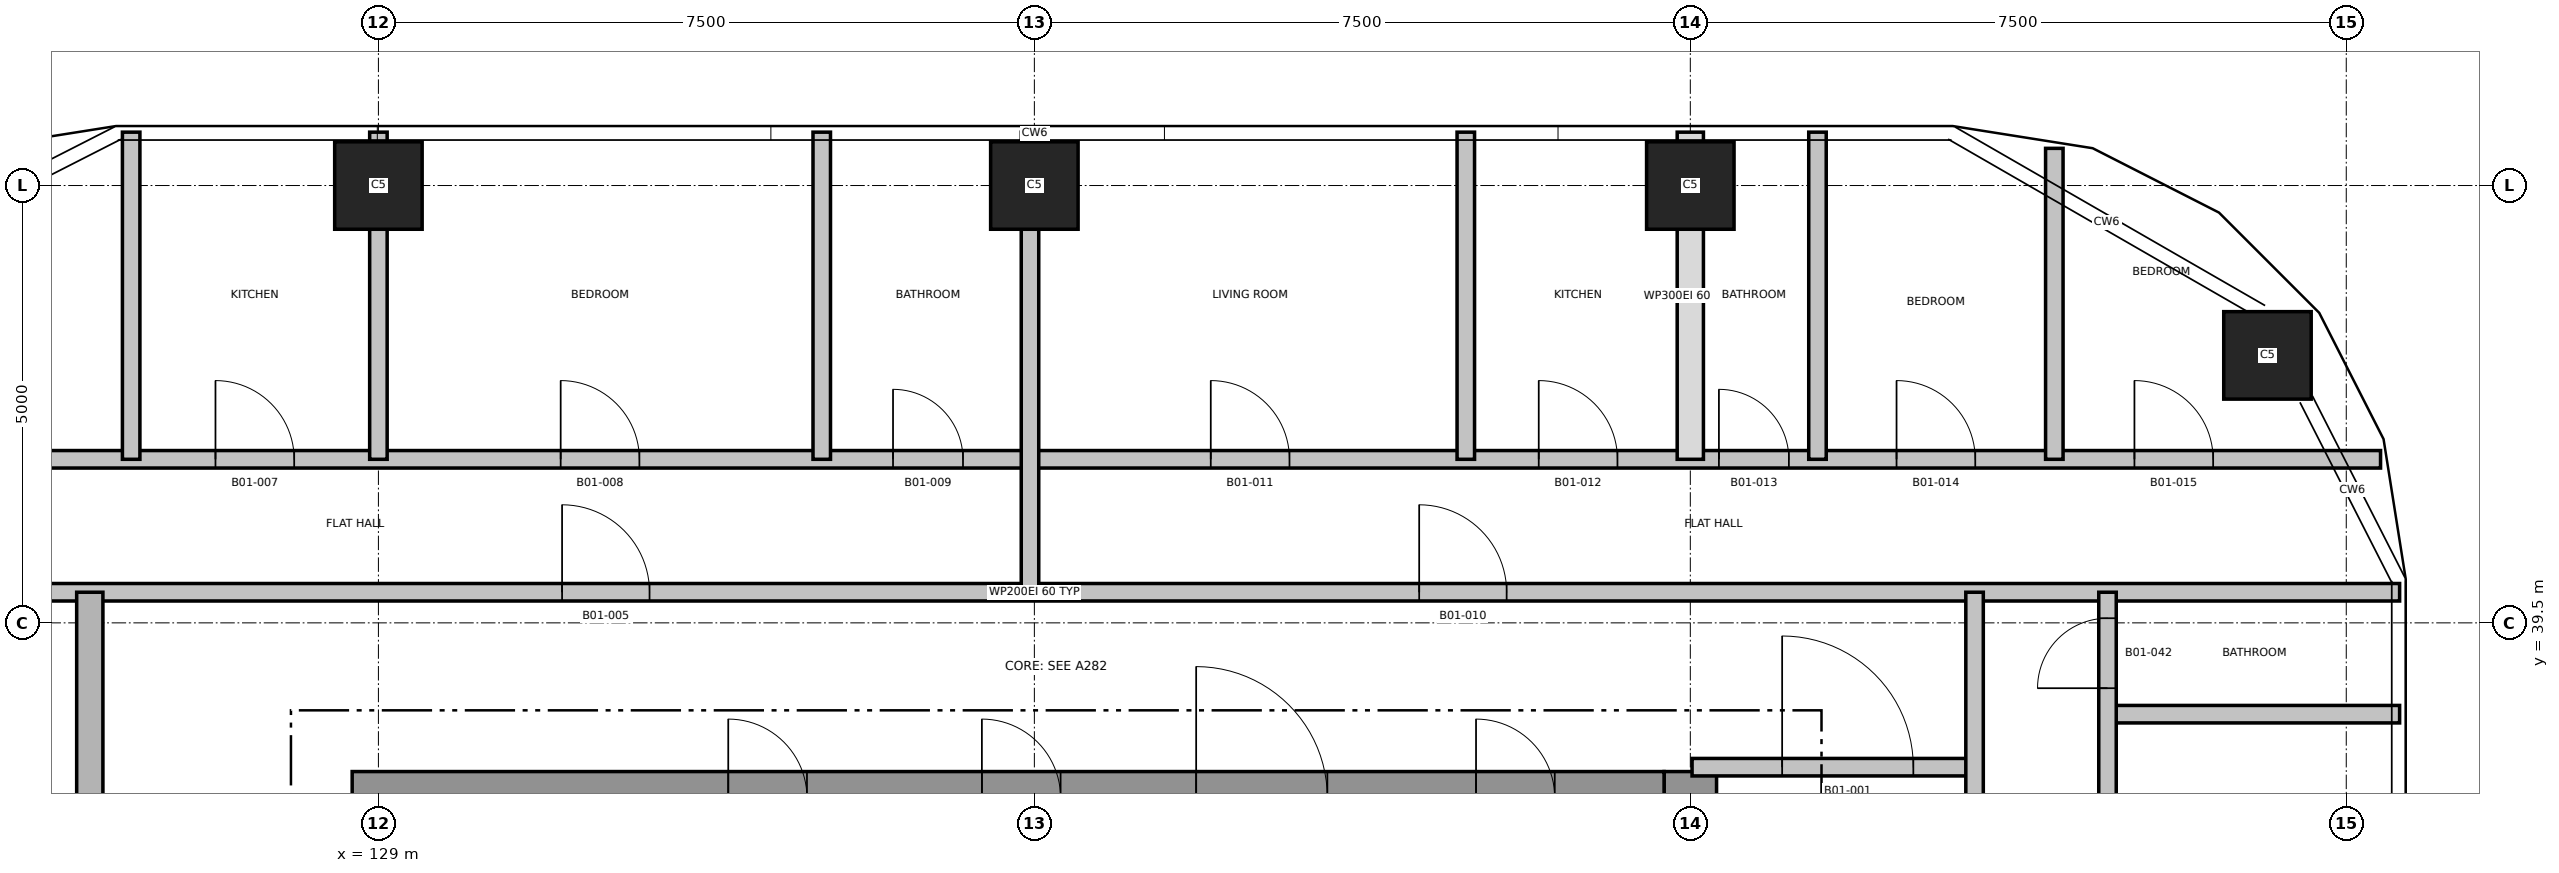
"""IFC4 building model, lengths in metres.
Left out: names, types, materials, properties, quantities, classifications, styles, units other than length and angle.
Written with IfcOpenShell. Run it as: python <this file> out.ifc"""

import sys

from ifc_helpers import new_model, si_unit, direction, frame, frame_2d, origin, origin_2d, place, context, subcontext, project, spatial, rectangle, extrude, element, fill, save


model = new_model("IFC4")
c1 = context("Model", 3, precision=1e-05, world=origin(), true_north=direction((0.0, 1.0)))
c2 = subcontext(c1, "Body", "Model", "MODEL_VIEW")
j1 = project(units=[si_unit("LENGTHUNIT", "METRE"), si_unit("PLANEANGLEUNIT", "RADIAN")], contexts=[c1])
p1 = place(None, origin())
s1 = spatial("IfcSite", under=j1, at=p1, CompositionType="ELEMENT")
p2 = place(p1, origin())
s2 = spatial("IfcBuilding", under=s1, at=p2, CompositionType="ELEMENT")
p3 = place(p2, frame((0.0, 0.0, 37.2)))
s3 = spatial("IfcBuildingStorey", under=s2, at=p3, CompositionType="ELEMENT", Elevation=37.2)
p4 = place(p3, frame((144.0, 24.2, 0.0), z_axis=(0.0, 0.0, 1.0), x_axis=(0.0, 1.0, 0.0)))
e1 = element("IfcWall", 1, at=p4, inside=s3, PredefinedType="SHEAR", context=c2, shape_type="SweptSolid", body=[
    extrude(rectangle(XDim=13.6, YDim=0.6, at=frame_2d((6.8, 0.0))), origin(), (0.0, 0.0, 1.0), 3.7),
])
p5 = place(p3, frame((128.7, 37.5, 0.0), z_axis=(0.0, 0.0, 1.0), x_axis=(1.0, 0.0, 0.0)))
e2 = element("IfcWall", 2, at=p5, inside=s3, PredefinedType="SHEAR", context=c2, shape_type="SweptSolid", body=[
    extrude(rectangle(XDim=15.0, YDim=0.6, at=frame_2d((7.5, 0.0))), origin(), (0.0, 0.0, 1.0), 3.7),
])
p6 = place(p5, frame((9.65, 0.0, 0.0)))
e3 = element("IfcOpeningElement", 3, at=p6, cuts=e2, PredefinedType="OPENING", context=c2, shape_type="SweptSolid", body=[
    extrude(rectangle(XDim=1.5, YDim=2.1, at=frame_2d((0.75, 1.05))), frame((0.0, 0.31, 0.0), z_axis=(0.0, -1.0, 0.0), x_axis=(1.0, 0.0, 0.0)), (0.0, 0.0, 1.0), 0.62),
])
p7 = place(p5, frame((12.85, 0.0, 0.0)))
e4 = element("IfcOpeningElement", 4, at=p7, cuts=e2, PredefinedType="OPENING", context=c2, shape_type="SweptSolid", body=[
    extrude(rectangle(XDim=0.9, YDim=2.1, at=frame_2d((0.45, 1.05))), frame((0.0, 0.31, 0.0), z_axis=(0.0, -1.0, 0.0), x_axis=(1.0, 0.0, 0.0)), (0.0, 0.0, 1.0), 0.62),
])
p8 = place(p5, frame((4.3, 0.0, 0.0)))
e5 = element("IfcOpeningElement", 5, at=p8, cuts=e2, PredefinedType="OPENING", context=c2, shape_type="SweptSolid", body=[
    extrude(rectangle(XDim=0.9, YDim=2.1, at=frame_2d((0.45, 1.05))), frame((0.0, 0.31, 0.0), z_axis=(0.0, -1.0, 0.0), x_axis=(1.0, 0.0, 0.0)), (0.0, 0.0, 1.0), 0.62),
])
p9 = place(p5, frame((7.2, 0.0, 0.0)))
e6 = element("IfcOpeningElement", 6, at=p9, cuts=e2, PredefinedType="OPENING", context=c2, shape_type="SweptSolid", body=[
    extrude(rectangle(XDim=0.9, YDim=2.1, at=frame_2d((0.45, 1.05))), frame((0.0, 0.31, 0.0), z_axis=(0.0, -1.0, 0.0), x_axis=(1.0, 0.0, 0.0)), (0.0, 0.0, 1.0), 0.62),
])
for number, where, z_axis, x_axis in (
    (7, (150.599, 42.558, 0.0), (0.0, 0.0, 1.0), (1.0, 0.0, 0.0)),
    (8, (129.0, 44.5, 0.0), (0.0, 0.0, 1.0), (1.0, 0.0, 0.0)),
    (9, (136.5, 44.5, 0.0), (0.0, 0.0, 1.0), (1.0, 0.0, 0.0)),
    (10, (144.0, 44.5, 0.0), (0.0, 0.0, 1.0), (1.0, 0.0, 0.0)),
):
    element("IfcColumn", number, at=place(p3, frame(where, z_axis=z_axis, x_axis=x_axis)), inside=s3, PredefinedType="COLUMN", context=c2, shape_type="SweptSolid", body=[
        extrude(rectangle(XDim=1.0, YDim=1.0, at=origin_2d()), origin(), (0.0, 0.0, 1.0), 3.7),
    ])
p10 = place(p3, frame((144.02, 37.85, 0.0), z_axis=(0.0, 0.0, 1.0), x_axis=(1.0, 0.0, 0.0)))
e11 = element("IfcWall", 11, at=p10, inside=s3, PredefinedType="PARTITIONING", context=c2, shape_type="SweptSolid", body=[
    extrude(rectangle(XDim=3.23, YDim=0.2, at=frame_2d((1.615, 0.0))), origin(), (0.0, 0.0, 1.0), 3.4),
])
p11 = place(p10, frame((1.03, 0.0, 0.0)))
e12 = element("IfcOpeningElement", 12, at=p11, cuts=e11, PredefinedType="OPENING", context=c2, shape_type="SweptSolid", body=[
    extrude(rectangle(XDim=1.5, YDim=2.1, at=frame_2d((0.75, 1.05))), frame((0.0, 0.11, 0.0), z_axis=(0.0, -1.0, 0.0), x_axis=(1.0, 0.0, 0.0)), (0.0, 0.0, 1.0), 0.22),
])
p12 = place(p3, frame((148.77, 38.456, 0.0), z_axis=(0.0, 0.0, 1.0), x_axis=(1.0, 0.0, 0.0)))
e13 = element("IfcWall", 13, at=p12, inside=s3, PredefinedType="PARTITIONING", context=c2, shape_type="SweptSolid", body=[
    extrude(rectangle(XDim=3.34, YDim=0.2, at=frame_2d((1.67, 0.0))), origin(), (0.0, 0.0, 1.0), 3.4),
])
p13 = place(p3, frame((120.89, 39.85, 0.0), z_axis=(0.0, 0.0, 1.0), x_axis=(1.0, 0.0, 0.0)))
e14 = element("IfcWall", 14, at=p13, inside=s3, PredefinedType="PARTITIONING", context=c2, shape_type="SweptSolid", body=[
    extrude(rectangle(XDim=31.22, YDim=0.2, at=frame_2d((15.61, 0.0))), origin(), (0.0, 0.0, 1.0), 3.4),
])
p14 = place(p13, frame((10.21, 0.0, 0.0)))
e15 = element("IfcOpeningElement", 15, at=p14, cuts=e14, PredefinedType="OPENING", context=c2, shape_type="SweptSolid", body=[
    extrude(rectangle(XDim=1.0, YDim=2.1, at=frame_2d((0.5, 1.05))), frame((0.0, 0.11, 0.0), z_axis=(0.0, -1.0, 0.0), x_axis=(1.0, 0.0, 0.0)), (0.0, 0.0, 1.0), 0.22),
])
p15 = place(p13, frame((20.01, 0.0, 0.0)))
e16 = element("IfcOpeningElement", 16, at=p15, cuts=e14, PredefinedType="OPENING", context=c2, shape_type="SweptSolid", body=[
    extrude(rectangle(XDim=1.0, YDim=2.1, at=frame_2d((0.5, 1.05))), frame((0.0, 0.11, 0.0), z_axis=(0.0, -1.0, 0.0), x_axis=(1.0, 0.0, 0.0)), (0.0, 0.0, 1.0), 0.22),
])
p16 = place(p3, frame((121.108, 41.37, 0.0), z_axis=(0.0, 0.0, 1.0), x_axis=(1.0, 0.0, 0.0)))
e17 = element("IfcWall", 17, at=p16, inside=s3, PredefinedType="PARTITIONING", context=c2, shape_type="SweptSolid", body=[
    extrude(rectangle(XDim=30.784, YDim=0.2, at=frame_2d((15.392, 0.0))), origin(), (0.0, 0.0, 1.0), 3.4),
])
p17 = place(p16, frame((2.081, 0.0, 0.0)))
e18 = element("IfcOpeningElement", 18, at=p17, cuts=e17, PredefinedType="OPENING", context=c2, shape_type="SweptSolid", body=[
    extrude(rectangle(XDim=0.9, YDim=2.1, at=frame_2d((0.45, 1.05))), frame((0.0, 0.11, 0.0), z_axis=(0.0, -1.0, 0.0), x_axis=(1.0, 0.0, 0.0)), (0.0, 0.0, 1.0), 0.22),
])
p18 = place(p16, frame((6.029, 0.0, 0.0)))
e19 = element("IfcOpeningElement", 19, at=p18, cuts=e17, PredefinedType="OPENING", context=c2, shape_type="SweptSolid", body=[
    extrude(rectangle(XDim=0.9, YDim=2.1, at=frame_2d((0.45, 1.05))), frame((0.0, 0.11, 0.0), z_axis=(0.0, -1.0, 0.0), x_axis=(1.0, 0.0, 0.0)), (0.0, 0.0, 1.0), 0.22),
])
p19 = place(p16, frame((9.976, 0.0, 0.0)))
e20 = element("IfcOpeningElement", 20, at=p19, cuts=e17, PredefinedType="OPENING", context=c2, shape_type="SweptSolid", body=[
    extrude(rectangle(XDim=0.9, YDim=2.1, at=frame_2d((0.45, 1.05))), frame((0.0, 0.11, 0.0), z_axis=(0.0, -1.0, 0.0), x_axis=(1.0, 0.0, 0.0)), (0.0, 0.0, 1.0), 0.22),
])
p20 = place(p16, frame((13.776, 0.0, 0.0)))
e21 = element("IfcOpeningElement", 21, at=p20, cuts=e17, PredefinedType="OPENING", context=c2, shape_type="SweptSolid", body=[
    extrude(rectangle(XDim=0.8, YDim=2.1, at=frame_2d((0.4, 1.05))), frame((0.0, 0.11, 0.0), z_axis=(0.0, -1.0, 0.0), x_axis=(1.0, 0.0, 0.0)), (0.0, 0.0, 1.0), 0.22),
])
p21 = place(p16, frame((17.409, 0.0, 0.0)))
e22 = element("IfcOpeningElement", 22, at=p21, cuts=e17, PredefinedType="OPENING", context=c2, shape_type="SweptSolid", body=[
    extrude(rectangle(XDim=0.9, YDim=2.1, at=frame_2d((0.45, 1.05))), frame((0.0, 0.11, 0.0), z_axis=(0.0, -1.0, 0.0), x_axis=(1.0, 0.0, 0.0)), (0.0, 0.0, 1.0), 0.22),
])
p22 = place(p16, frame((21.159, 0.0, 0.0)))
e23 = element("IfcOpeningElement", 23, at=p22, cuts=e17, PredefinedType="OPENING", context=c2, shape_type="SweptSolid", body=[
    extrude(rectangle(XDim=0.9, YDim=2.1, at=frame_2d((0.45, 1.05))), frame((0.0, 0.11, 0.0), z_axis=(0.0, -1.0, 0.0), x_axis=(1.0, 0.0, 0.0)), (0.0, 0.0, 1.0), 0.22),
])
p23 = place(p16, frame((23.219, 0.0, 0.0)))
e24 = element("IfcOpeningElement", 24, at=p23, cuts=e17, PredefinedType="OPENING", context=c2, shape_type="SweptSolid", body=[
    extrude(rectangle(XDim=0.8, YDim=2.1, at=frame_2d((0.4, 1.05))), frame((0.0, 0.11, 0.0), z_axis=(0.0, -1.0, 0.0), x_axis=(1.0, 0.0, 0.0)), (0.0, 0.0, 1.0), 0.22),
])
p24 = place(p16, frame((25.25, 0.0, 0.0)))
e25 = element("IfcOpeningElement", 25, at=p24, cuts=e17, PredefinedType="OPENING", context=c2, shape_type="SweptSolid", body=[
    extrude(rectangle(XDim=0.9, YDim=2.1, at=frame_2d((0.45, 1.05))), frame((0.0, 0.11, 0.0), z_axis=(0.0, -1.0, 0.0), x_axis=(1.0, 0.0, 0.0)), (0.0, 0.0, 1.0), 0.22),
])
p25 = place(p16, frame((27.97, 0.0, 0.0)))
e26 = element("IfcOpeningElement", 26, at=p25, cuts=e17, PredefinedType="OPENING", context=c2, shape_type="SweptSolid", body=[
    extrude(rectangle(XDim=0.9, YDim=2.1, at=frame_2d((0.45, 1.05))), frame((0.0, 0.11, 0.0), z_axis=(0.0, -1.0, 0.0), x_axis=(1.0, 0.0, 0.0)), (0.0, 0.0, 1.0), 0.22),
])
p26 = place(p3, frame((125.7, 22.15, 0.0), z_axis=(0.0, 0.0, 1.0), x_axis=(0.0, 1.0, 0.0)))
e27 = element("IfcWall", 27, at=p26, inside=s3, PredefinedType="SHEAR", context=c2, shape_type="SweptSolid", body=[
    extrude(rectangle(XDim=17.7, YDim=0.3, at=frame_2d((8.85, 0.0))), origin(), (0.0, 0.0, 1.0), 3.4),
])
p27 = place(p26, frame((2.7, 0.0, 0.0)))
e28 = element("IfcOpeningElement", 28, at=p27, cuts=e27, PredefinedType="OPENING", context=c2, shape_type="SweptSolid", body=[
    extrude(rectangle(XDim=1.0, YDim=2.1, at=frame_2d((0.5, 1.05))), frame((0.0, 0.16, 0.0), z_axis=(0.0, -1.0, 0.0), x_axis=(1.0, 0.0, 0.0)), (0.0, 0.0, 1.0), 0.32),
])
for number, where, z_axis, x_axis in (
    (29, (126.173, 41.37, 0.0), (0.0, 0.0, 1.0), (0.0, 1.0, 0.0)),
    (30, (129.0, 41.37, 0.0), (0.0, 0.0, 1.0), (0.0, 1.0, 0.0)),
    (31, (134.069, 41.37, 0.0), (0.0, 0.0, 1.0), (0.0, 1.0, 0.0)),
):
    element("IfcWall", number, at=place(p3, frame(where, z_axis=z_axis, x_axis=x_axis)), inside=s3, PredefinedType="PARTITIONING", context=c2, shape_type="SweptSolid", body=[
        extrude(rectangle(XDim=3.74, YDim=0.2, at=frame_2d((1.87, 0.0))), origin(), (0.0, 0.0, 1.0), 3.4),
    ])
p28 = place(p3, frame((136.45, 39.85, 0.0), z_axis=(0.0, 0.0, 1.0), x_axis=(0.0, 1.0, 0.0)))
e32 = element("IfcWall", 32, at=p28, inside=s3, PredefinedType="PARTITIONING", context=c2, shape_type="SweptSolid", body=[
    extrude(rectangle(XDim=5.26, YDim=0.2, at=frame_2d((2.63, 0.0))), origin(), (0.0, 0.0, 1.0), 3.4),
])
p29 = place(p3, frame((141.433, 41.37, 0.0), z_axis=(0.0, 0.0, 1.0), x_axis=(0.0, 1.0, 0.0)))
e33 = element("IfcWall", 33, at=p29, inside=s3, PredefinedType="PARTITIONING", context=c2, shape_type="SweptSolid", body=[
    extrude(rectangle(XDim=3.74, YDim=0.2, at=frame_2d((1.87, 0.0))), origin(), (0.0, 0.0, 1.0), 3.4),
])
p30 = place(p3, frame((144.0, 41.37, 0.0), z_axis=(0.0, 0.0, 1.0), x_axis=(0.0, 1.0, 0.0)))
e34 = element("IfcWall", 34, at=p30, inside=s3, PredefinedType="PARTITIONING", context=c2, shape_type="SweptSolid", body=[
    extrude(rectangle(XDim=3.74, YDim=0.3, at=frame_2d((1.87, 0.0))), origin(), (0.0, 0.0, 1.0), 3.4),
])
p31 = place(p3, frame((145.454, 41.37, 0.0), z_axis=(0.0, 0.0, 1.0), x_axis=(0.0, 1.0, 0.0)))
e35 = element("IfcWall", 35, at=p31, inside=s3, PredefinedType="PARTITIONING", context=c2, shape_type="SweptSolid", body=[
    extrude(rectangle(XDim=3.74, YDim=0.2, at=frame_2d((1.87, 0.0))), origin(), (0.0, 0.0, 1.0), 3.4),
])
p32 = place(p3, frame((147.25, 22.15, 0.0), z_axis=(0.0, 0.0, 1.0), x_axis=(0.0, 1.0, 0.0)))
e36 = element("IfcWall", 36, at=p32, inside=s3, PredefinedType="PARTITIONING", context=c2, shape_type="SweptSolid", body=[
    extrude(rectangle(XDim=17.7, YDim=0.2, at=frame_2d((8.85, 0.0))), origin(), (0.0, 0.0, 1.0), 3.4),
])
p33 = place(p32, frame((2.65, 0.0, 0.0)))
e37 = element("IfcOpeningElement", 37, at=p33, cuts=e36, PredefinedType="OPENING", context=c2, shape_type="SweptSolid", body=[
    extrude(rectangle(XDim=1.0, YDim=2.1, at=frame_2d((0.5, 1.05))), frame((0.0, 0.11, 0.0), z_axis=(0.0, -1.0, 0.0), x_axis=(1.0, 0.0, 0.0)), (0.0, 0.0, 1.0), 0.22),
])
p34 = place(p3, frame((148.162, 41.37, 0.0), z_axis=(0.0, 0.0, 1.0), x_axis=(0.0, 1.0, 0.0)))
e38 = element("IfcWall", 38, at=p34, inside=s3, PredefinedType="PARTITIONING", context=c2, shape_type="SweptSolid", body=[
    extrude(rectangle(XDim=3.555, YDim=0.2, at=frame_2d((1.777, 0.0))), origin(), (0.0, 0.0, 1.0), 3.4),
])
p35 = place(p3, frame((148.77, 22.15, 0.0), z_axis=(0.0, 0.0, 1.0), x_axis=(0.0, 1.0, 0.0)))
e39 = element("IfcWall", 39, at=p35, inside=s3, PredefinedType="PARTITIONING", context=c2, shape_type="SweptSolid", body=[
    extrude(rectangle(XDim=17.7, YDim=0.2, at=frame_2d((8.85, 0.0))), origin(), (0.0, 0.0, 1.0), 3.4),
])
p36 = place(p35, frame((1.725, 0.0, 0.0)))
e40 = element("IfcOpeningElement", 40, at=p36, cuts=e39, PredefinedType="OPENING", context=c2, shape_type="SweptSolid", body=[
    extrude(rectangle(XDim=0.9, YDim=2.1, at=frame_2d((0.45, 1.05))), frame((0.0, 0.11, 0.0), z_axis=(0.0, -1.0, 0.0), x_axis=(1.0, 0.0, 0.0)), (0.0, 0.0, 1.0), 0.22),
])
p37 = place(p35, frame((6.195, 0.0, 0.0)))
e41 = element("IfcOpeningElement", 41, at=p37, cuts=e39, PredefinedType="OPENING", context=c2, shape_type="SweptSolid", body=[
    extrude(rectangle(XDim=0.9, YDim=2.1, at=frame_2d((0.45, 1.05))), frame((0.0, 0.11, 0.0), z_axis=(0.0, -1.0, 0.0), x_axis=(1.0, 0.0, 0.0)), (0.0, 0.0, 1.0), 0.22),
])
p38 = place(p35, frame((9.641, 0.0, 0.0)))
e42 = element("IfcOpeningElement", 42, at=p38, cuts=e39, PredefinedType="OPENING", context=c2, shape_type="SweptSolid", body=[
    extrude(rectangle(XDim=0.9, YDim=2.1, at=frame_2d((0.45, 1.05))), frame((0.0, 0.11, 0.0), z_axis=(0.0, -1.0, 0.0), x_axis=(1.0, 0.0, 0.0)), (0.0, 0.0, 1.0), 0.22),
])
p39 = place(p35, frame((11.895, 0.0, 0.0)))
e43 = element("IfcOpeningElement", 43, at=p39, cuts=e39, PredefinedType="OPENING", context=c2, shape_type="SweptSolid", body=[
    extrude(rectangle(XDim=0.8, YDim=2.1, at=frame_2d((0.4, 1.05))), frame((0.0, 0.11, 0.0), z_axis=(0.0, -1.0, 0.0), x_axis=(1.0, 0.0, 0.0)), (0.0, 0.0, 1.0), 0.22),
])
p40 = place(p35, frame((14.378, 0.0, 0.0)))
e44 = element("IfcOpeningElement", 44, at=p40, cuts=e39, PredefinedType="OPENING", context=c2, shape_type="SweptSolid", body=[
    extrude(rectangle(XDim=0.9, YDim=2.1, at=frame_2d((0.45, 1.05))), frame((0.0, 0.11, 0.0), z_axis=(0.0, -1.0, 0.0), x_axis=(1.0, 0.0, 0.0)), (0.0, 0.0, 1.0), 0.22),
])
p41 = place(p35, frame((16.603, 0.0, 0.0)))
e45 = element("IfcOpeningElement", 45, at=p41, cuts=e39, PredefinedType="OPENING", context=c2, shape_type="SweptSolid", body=[
    extrude(rectangle(XDim=0.8, YDim=2.1, at=frame_2d((0.4, 1.05))), frame((0.0, 0.11, 0.0), z_axis=(0.0, -1.0, 0.0), x_axis=(1.0, 0.0, 0.0)), (0.0, 0.0, 1.0), 0.22),
])
p42 = place(p11, origin())
e46 = element("IfcDoor", 46, at=p42, inside=s3, OperationType="SINGLE_SWING_LEFT", PredefinedType="DOOR", context=c2, shape_type="SweptSolid", body=[
    extrude(rectangle(XDim=1.5, YDim=2.1, at=frame_2d((0.75, 1.05))), frame((0.0, 0.025, 0.0), z_axis=(0.0, -1.0, 0.0), x_axis=(1.0, 0.0, 0.0)), (0.0, 0.0, 1.0), 0.05),
])
fill(e12, e46)
p43 = place(p14, origin())
e47 = element("IfcDoor", 47, at=p43, inside=s3, OperationType="SINGLE_SWING_LEFT", PredefinedType="DOOR", context=c2, shape_type="SweptSolid", body=[
    extrude(rectangle(XDim=1.0, YDim=2.1, at=frame_2d((0.5, 1.05))), frame((0.0, 0.025, 0.0), z_axis=(0.0, -1.0, 0.0), x_axis=(1.0, 0.0, 0.0)), (0.0, 0.0, 1.0), 0.05),
])
fill(e15, e47)
p44 = place(p18, origin())
e48 = element("IfcDoor", 48, at=p44, inside=s3, OperationType="SINGLE_SWING_LEFT", PredefinedType="DOOR", context=c2, shape_type="SweptSolid", body=[
    extrude(rectangle(XDim=0.9, YDim=2.1, at=frame_2d((0.45, 1.05))), frame((0.0, 0.025, 0.0), z_axis=(0.0, -1.0, 0.0), x_axis=(1.0, 0.0, 0.0)), (0.0, 0.0, 1.0), 0.05),
])
fill(e19, e48)
p45 = place(p19, origin())
e49 = element("IfcDoor", 49, at=p45, inside=s3, OperationType="SINGLE_SWING_RIGHT", PredefinedType="DOOR", context=c2, shape_type="SweptSolid", body=[
    extrude(rectangle(XDim=0.9, YDim=2.1, at=frame_2d((0.45, 1.05))), frame((0.0, 0.025, 0.0), z_axis=(0.0, -1.0, 0.0), x_axis=(1.0, 0.0, 0.0)), (0.0, 0.0, 1.0), 0.05),
])
fill(e20, e49)
p46 = place(p20, origin())
e50 = element("IfcDoor", 50, at=p46, inside=s3, OperationType="SINGLE_SWING_LEFT", PredefinedType="DOOR", context=c2, shape_type="SweptSolid", body=[
    extrude(rectangle(XDim=0.8, YDim=2.1, at=frame_2d((0.4, 1.05))), frame((0.0, 0.025, 0.0), z_axis=(0.0, -1.0, 0.0), x_axis=(1.0, 0.0, 0.0)), (0.0, 0.0, 1.0), 0.05),
])
fill(e21, e50)
p47 = place(p15, origin())
e51 = element("IfcDoor", 51, at=p47, inside=s3, OperationType="SINGLE_SWING_RIGHT", PredefinedType="DOOR", context=c2, shape_type="SweptSolid", body=[
    extrude(rectangle(XDim=1.0, YDim=2.1, at=frame_2d((0.5, 1.05))), frame((0.0, 0.025, 0.0), z_axis=(0.0, -1.0, 0.0), x_axis=(1.0, 0.0, 0.0)), (0.0, 0.0, 1.0), 0.05),
])
fill(e16, e51)
p48 = place(p21, origin())
e52 = element("IfcDoor", 52, at=p48, inside=s3, OperationType="SINGLE_SWING_LEFT", PredefinedType="DOOR", context=c2, shape_type="SweptSolid", body=[
    extrude(rectangle(XDim=0.9, YDim=2.1, at=frame_2d((0.45, 1.05))), frame((0.0, 0.025, 0.0), z_axis=(0.0, -1.0, 0.0), x_axis=(1.0, 0.0, 0.0)), (0.0, 0.0, 1.0), 0.05),
])
fill(e22, e52)
p49 = place(p22, origin())
e53 = element("IfcDoor", 53, at=p49, inside=s3, OperationType="SINGLE_SWING_RIGHT", PredefinedType="DOOR", context=c2, shape_type="SweptSolid", body=[
    extrude(rectangle(XDim=0.9, YDim=2.1, at=frame_2d((0.45, 1.05))), frame((0.0, 0.025, 0.0), z_axis=(0.0, -1.0, 0.0), x_axis=(1.0, 0.0, 0.0)), (0.0, 0.0, 1.0), 0.05),
])
fill(e23, e53)
p50 = place(p23, origin())
e54 = element("IfcDoor", 54, at=p50, inside=s3, OperationType="SINGLE_SWING_LEFT", PredefinedType="DOOR", context=c2, shape_type="SweptSolid", body=[
    extrude(rectangle(XDim=0.8, YDim=2.1, at=frame_2d((0.4, 1.05))), frame((0.0, 0.025, 0.0), z_axis=(0.0, -1.0, 0.0), x_axis=(1.0, 0.0, 0.0)), (0.0, 0.0, 1.0), 0.05),
])
fill(e24, e54)
p51 = place(p24, origin())
e55 = element("IfcDoor", 55, at=p51, inside=s3, OperationType="SINGLE_SWING_RIGHT", PredefinedType="DOOR", context=c2, shape_type="SweptSolid", body=[
    extrude(rectangle(XDim=0.9, YDim=2.1, at=frame_2d((0.45, 1.05))), frame((0.0, 0.025, 0.0), z_axis=(0.0, -1.0, 0.0), x_axis=(1.0, 0.0, 0.0)), (0.0, 0.0, 1.0), 0.05),
])
fill(e25, e55)
p52 = place(p25, origin())
e56 = element("IfcDoor", 56, at=p52, inside=s3, OperationType="SINGLE_SWING_LEFT", PredefinedType="DOOR", context=c2, shape_type="SweptSolid", body=[
    extrude(rectangle(XDim=0.9, YDim=2.1, at=frame_2d((0.45, 1.05))), frame((0.0, 0.025, 0.0), z_axis=(0.0, -1.0, 0.0), x_axis=(1.0, 0.0, 0.0)), (0.0, 0.0, 1.0), 0.05),
])
fill(e26, e56)
p53 = place(p41, origin())
e57 = element("IfcDoor", 57, at=p53, inside=s3, OperationType="SINGLE_SWING_RIGHT", PredefinedType="DOOR", context=c2, shape_type="SweptSolid", body=[
    extrude(rectangle(XDim=0.8, YDim=2.1, at=frame_2d((0.4, 1.05))), frame((0.0, 0.025, 0.0), z_axis=(0.0, -1.0, 0.0), x_axis=(1.0, 0.0, 0.0)), (0.0, 0.0, 1.0), 0.05),
])
fill(e45, e57)
save(model, sys.argv[1])
